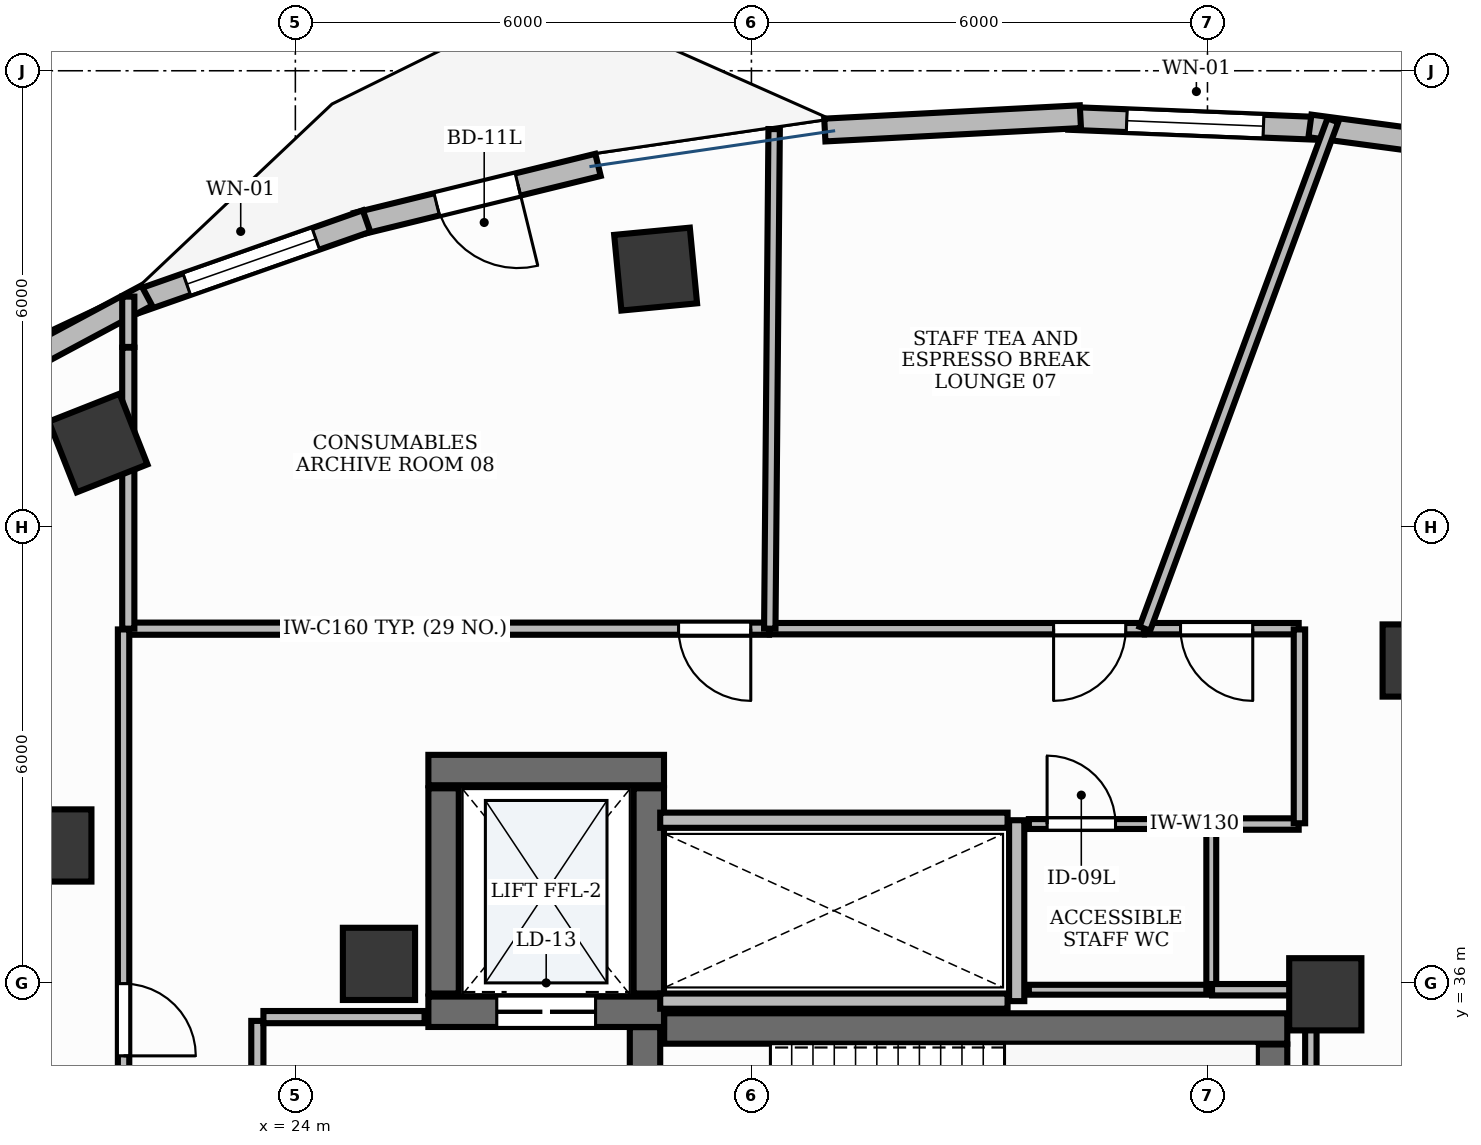
"""IFC4 building model, lengths in metres.
Left out: names, types, materials, properties, quantities, classifications, styles, units other than length and angle.
Written with IfcOpenShell. Run it as: python <this file> out.ifc"""

import sys

from ifc_helpers import new_model, si_unit, direction, frame, frame_2d, origin, origin_2d, place, context, subcontext, project, spatial, rectangle, extrude, element, fill, save


model = new_model("IFC4")
c1 = context("Model", 3, precision=1e-05, world=origin(), true_north=direction((0.0, 1.0)))
c2 = subcontext(c1, "Body", "Model", "MODEL_VIEW")
j1 = project(units=[si_unit("LENGTHUNIT", "METRE"), si_unit("PLANEANGLEUNIT", "RADIAN")], contexts=[c1])
p1 = place(None, origin())
s1 = spatial("IfcSite", under=j1, at=p1, CompositionType="ELEMENT")
p2 = place(p1, origin())
s2 = spatial("IfcBuilding", under=s1, at=p2, CompositionType="ELEMENT")
p3 = place(p2, frame((0.0, 0.0, 187.8)))
s3 = spatial("IfcBuildingStorey", under=s2, at=p3, CompositionType="ELEMENT", Elevation=187.8)
p4 = place(p3, frame((28.852, 35.4, 0.0), z_axis=(0.0, 0.0, 1.0), x_axis=(1.0, 0.0, 0.0)))
e1 = element("IfcWall", 1, at=p4, inside=s3, PredefinedType="SHEAR", context=c2, shape_type="SweptSolid", body=[
    extrude(rectangle(XDim=8.198, YDim=0.4, at=frame_2d((4.099, 0.0))), origin(), (0.0, 0.0, 1.0), 3.9),
])
p5 = place(p3, frame((36.85, 32.11, 0.0), z_axis=(0.0, 0.0, 1.0), x_axis=(0.0, 1.0, 0.0)))
e2 = element("IfcWall", 2, at=p5, inside=s3, PredefinedType="SHEAR", context=c2, shape_type="SweptSolid", body=[
    extrude(rectangle(XDim=3.08, YDim=0.4, at=frame_2d((1.54, 0.0))), origin(), (0.0, 0.0, 1.0), 3.9),
])
p6 = place(p3, frame((28.6, 32.11, 0.0), z_axis=(0.0, 0.0, 1.0), x_axis=(0.0, 1.0, 0.0)))
e3 = element("IfcWall", 3, at=p6, inside=s3, PredefinedType="SHEAR", context=c2, shape_type="SweptSolid", body=[
    extrude(rectangle(XDim=3.308, YDim=0.4, at=frame_2d((1.654, 0.0))), origin(), (0.0, 0.0, 1.0), 3.9),
])
p7 = place(p6, frame((0.2, 0.0, 0.0)))
e4 = element("IfcOpeningElement", 4, at=p7, cuts=e3, PredefinedType="OPENING", context=c2, shape_type="SweptSolid", body=[
    extrude(rectangle(XDim=1.05, YDim=2.15, at=frame_2d((0.525, 1.075))), frame((0.0, 0.215, 0.0), z_axis=(0.0, -1.0, 0.0), x_axis=(1.0, 0.0, 0.0)), (0.0, 0.0, 1.0), 0.43),
])
p8 = place(p3, frame((25.75, 38.8, 0.0), z_axis=(0.0, 0.0, 1.0), x_axis=(1.0, 0.0, 0.0)))
e5 = element("IfcWall", 5, at=p8, inside=s3, PredefinedType="SHEAR", context=c2, shape_type="SweptSolid", body=[
    extrude(rectangle(XDim=3.1, YDim=0.4, at=frame_2d((1.55, 0.0))), origin(), (0.0, 0.0, 1.0), 3.9),
])
p9 = place(p3, frame((25.75, 35.62, 0.0), z_axis=(0.0, 0.0, 1.0), x_axis=(1.0, 0.0, 0.0)))
e6 = element("IfcWall", 6, at=p9, inside=s3, PredefinedType="SHEAR", context=c2, shape_type="SweptSolid", body=[
    extrude(rectangle(XDim=3.1, YDim=0.4, at=frame_2d((1.55, 0.0))), origin(), (0.0, 0.0, 1.0), 3.9),
])
p10 = place(p9, frame((0.9, 0.0, 0.0)))
e7 = element("IfcOpeningElement", 7, at=p10, cuts=e6, PredefinedType="OPENING", context=c2, shape_type="SweptSolid", body=[
    extrude(rectangle(XDim=1.3, YDim=2.2, at=frame_2d((0.65, 1.1))), frame((0.0, 0.215, 0.0), z_axis=(0.0, -1.0, 0.0), x_axis=(1.0, 0.0, 0.0)), (0.0, 0.0, 1.0), 0.43),
])
for number, where, z_axis, x_axis in (
    (8, (25.95, 35.86, 0.0), (0.0, 0.0, 1.0), (0.0, 1.0, 0.0)),
    (9, (28.65, 35.86, 0.0), (0.0, 0.0, 1.0), (0.0, 1.0, 0.0)),
):
    element("IfcWall", number, at=place(p3, frame(where, z_axis=z_axis, x_axis=x_axis)), inside=s3, PredefinedType="SHEAR", context=c2, shape_type="SweptSolid", body=[
        extrude(rectangle(XDim=2.7, YDim=0.4, at=frame_2d((1.35, 0.0))), origin(), (0.0, 0.0, 1.0), 3.9),
    ])
for number, where, z_axis, x_axis in (
    (10, (37.55, 35.85, -0.0), (0.0, 0.0, 1.0), (1.0, 0.0, 0.0)),
    (11, (25.1, 36.25, -0.0), (0.0, 0.0, 1.0), (1.0, 0.0, 0.0)),
):
    element("IfcColumn", number, at=place(p3, frame(where, z_axis=z_axis, x_axis=x_axis)), inside=s3, PredefinedType="PILASTER", context=c2, shape_type="SweptSolid", body=[
        extrude(rectangle(XDim=0.95, YDim=0.95, at=origin_2d()), origin(), (0.0, 0.0, 1.0), 3.901),
    ])
p11 = place(p3, frame((38.779, 40.241, -0.0), z_axis=(0.0, 0.0, 1.0), x_axis=(1.0, 0.0, 0.0)))
e12 = element("IfcColumn", 12, at=p11, inside=s3, PredefinedType="COLUMN", context=c2, shape_type="SweptSolid", body=[
    extrude(rectangle(XDim=0.95, YDim=0.95, at=origin_2d()), origin(), (0.0, 0.0, 1.0), 3.901),
])
for number, where, z_axis, x_axis in (
    (13, (28.74, 45.39, -0.0), (0.0, 0.0, 1.0), (0.995, 0.095, 0.0)),
    (14, (21.406, 43.103, -0.0), (0.0, 0.0, 1.0), (0.93, 0.367, 0.0)),
):
    element("IfcColumn", number, at=place(p3, frame(where, z_axis=z_axis, x_axis=x_axis)), inside=s3, PredefinedType="COLUMN", context=c2, shape_type="SweptSolid", body=[
        extrude(rectangle(XDim=1.0, YDim=1.0, at=origin_2d()), origin(), (0.0, 0.0, 1.0), 3.901),
    ])
p12 = place(p3, frame((20.842, 37.808, -0.0), z_axis=(0.0, 0.0, 1.0), x_axis=(1.0, 0.0, 0.0)))
e15 = element("IfcColumn", 15, at=p12, inside=s3, PredefinedType="COLUMN", context=c2, shape_type="SweptSolid", body=[
    extrude(rectangle(XDim=0.95, YDim=0.95, at=origin_2d()), origin(), (0.0, 0.0, 1.0), 3.901),
])
p13 = place(p3, frame((37.5, 47.24, 0.0), z_axis=(0.0, 0.0, 1.0), x_axis=(-0.999191674443, 0.040199474165, 0.0)))
e16 = element("IfcWall", 16, at=p13, inside=s3, PredefinedType="STANDARD", context=c2, shape_type="SweptSolid", body=[
    extrude(rectangle(XDim=3.328, YDim=0.3, at=frame_2d((1.664, 0.0))), origin(), (0.0, 0.0, 1.0), 3.9),
])
p14 = place(p13, frame((0.764, 0.0, 0.9)))
e17 = element("IfcOpeningElement", 17, at=p14, cuts=e16, PredefinedType="OPENING", context=c2, shape_type="SweptSolid", body=[
    extrude(rectangle(XDim=1.8, YDim=2.1, at=frame_2d((0.9, 1.05))), frame((0.0, 0.165, 0.0), z_axis=(0.0, -1.0, 0.0), x_axis=(1.0, 0.0, 0.0)), (0.0, 0.0, 1.0), 0.33),
])
p15 = place(p3, frame((27.982, 46.762, 0.0), z_axis=(0.0, 0.0, 1.0), x_axis=(-0.971312804689, -0.237805457142, 0.0)))
e18 = element("IfcWall", 18, at=p15, inside=s3, PredefinedType="STANDARD", context=c2, shape_type="SweptSolid", body=[
    extrude(rectangle(XDim=3.269, YDim=0.3, at=frame_2d((1.634, 0.0))), origin(), (0.0, 0.0, 1.0), 3.9),
])
p16 = place(p15, frame((1.084, 0.0, 0.0)))
e19 = element("IfcOpeningElement", 19, at=p16, cuts=e18, PredefinedType="OPENING", context=c2, shape_type="SweptSolid", body=[
    extrude(rectangle(XDim=1.1, YDim=2.15, at=frame_2d((0.55, 1.075))), frame((0.0, 0.165, 0.0), z_axis=(0.0, -1.0, 0.0), x_axis=(1.0, 0.0, 0.0)), (0.0, 0.0, 1.0), 0.33),
])
p17 = place(p3, frame((24.937, 46.023, 0.0), z_axis=(0.0, 0.0, 1.0), x_axis=(-0.943495444321, -0.331385495377, 0.0)))
e20 = element("IfcWall", 20, at=p17, inside=s3, PredefinedType="STANDARD", context=c2, shape_type="SweptSolid", body=[
    extrude(rectangle(XDim=3.214, YDim=0.3, at=frame_2d((1.607, 0.0))), origin(), (0.0, 0.0, 1.0), 3.9),
])
p18 = place(p17, frame((0.707, 0.0, 0.9)))
e21 = element("IfcOpeningElement", 21, at=p18, cuts=e20, PredefinedType="OPENING", context=c2, shape_type="SweptSolid", body=[
    extrude(rectangle(XDim=1.8, YDim=2.1, at=frame_2d((0.9, 1.05))), frame((0.0, 0.165, 0.0), z_axis=(0.0, -1.0, 0.0), x_axis=(1.0, 0.0, 0.0)), (0.0, 0.0, 1.0), 0.33),
])
p19 = place(p3, frame((40.669, 46.829, 0.0), z_axis=(0.0, 0.0, 1.0), x_axis=(-0.991137940717, 0.132836675925, 0.0)))
e22 = element("IfcWall", 22, at=p19, inside=s3, PredefinedType="STANDARD", context=c2, shape_type="SweptSolid", body=[
    extrude(rectangle(XDim=3.351, YDim=0.3, at=frame_2d((1.675, 0.0))), origin(), (0.0, 0.0, 1.0), 3.9),
])
p20 = place(p3, frame((34.328, 47.396, 0.0), z_axis=(0.0, 0.0, 1.0), x_axis=(-0.998639777298, -0.052140149581, 0.0)))
e23 = element("IfcWall", 23, at=p20, inside=s3, PredefinedType="STANDARD", context=c2, shape_type="SweptSolid", body=[
    extrude(rectangle(XDim=3.367, YDim=0.3, at=frame_2d((1.683, 0.0))), origin(), (0.0, 0.0, 1.0), 3.9),
])
p21 = place(p3, frame((22.044, 45.043, 0.0), z_axis=(0.0, 0.0, 1.0), x_axis=(-0.881364369565, -0.472437136624, 0.0)))
e24 = element("IfcWall", 24, at=p21, inside=s3, PredefinedType="STANDARD", context=c2, shape_type="SweptSolid", body=[
    extrude(rectangle(XDim=6.124, YDim=0.3, at=frame_2d((3.062, 0.0))), origin(), (0.0, 0.0, 1.0), 3.47),
])
p22 = place(p3, frame((33.49, 35.76, 0.0), z_axis=(0.0, 0.0, 1.0), x_axis=(0.0, 1.0, 0.0)))
e25 = element("IfcWall", 25, at=p22, inside=s3, PredefinedType="PARTITIONING", context=c2, shape_type="SweptSolid", body=[
    extrude(rectangle(XDim=2.38, YDim=0.2, at=frame_2d((1.19, 0.0))), origin(), (0.0, 0.0, 1.0), 2.91),
])
for number, where, z_axis, x_axis in (
    (26, (28.8, 35.76, 0.0), (0.0, 0.0, 1.0), (1.0, 0.0, 0.0)),
    (27, (28.8, 38.14, 0.0), (0.0, 0.0, 1.0), (1.0, 0.0, 0.0)),
):
    element("IfcWall", number, at=place(p3, frame(where, z_axis=z_axis, x_axis=x_axis)), inside=s3, PredefinedType="PARTITIONING", context=c2, shape_type="SweptSolid", body=[
        extrude(rectangle(XDim=4.57, YDim=0.2, at=frame_2d((2.285, 0.0))), origin(), (0.0, 0.0, 1.0), 2.91),
    ])
p23 = place(p3, frame((23.5, 32.1, 0.0), z_axis=(0.0, 0.0, 1.0), x_axis=(0.0, 1.0, 0.0)))
e28 = element("IfcWall", 28, at=p23, inside=s3, PredefinedType="PARTITIONING", context=c2, shape_type="SweptSolid", body=[
    extrude(rectangle(XDim=3.4, YDim=0.16, at=frame_2d((1.7, 0.0))), origin(), (0.0, 0.0, 1.0), 2.91),
])
p24 = place(p23, frame((1.175, 0.0, 0.0)))
e29 = element("IfcOpeningElement", 29, at=p24, cuts=e28, PredefinedType="OPENING", context=c2, shape_type="SweptSolid", body=[
    extrude(rectangle(XDim=1.05, YDim=2.15, at=frame_2d((0.525, 1.075))), frame((0.0, 0.095, 0.0), z_axis=(0.0, -1.0, 0.0), x_axis=(1.0, 0.0, 0.0)), (0.0, 0.0, 1.0), 0.19),
])
p25 = place(p3, frame((23.58, 35.55, 0.0), z_axis=(0.0, 0.0, 1.0), x_axis=(1.0, 0.0, 0.0)))
e30 = element("IfcWall", 30, at=p25, inside=s3, PredefinedType="PARTITIONING", context=c2, shape_type="SweptSolid", body=[
    extrude(rectangle(XDim=2.12, YDim=0.16, at=frame_2d((1.06, 0.0))), origin(), (0.0, 0.0, 1.0), 2.91),
])
p26 = place(p3, frame((33.65, 38.09, 0.0), z_axis=(0.0, 0.0, 1.0), x_axis=(1.0, 0.0, 0.0)))
e31 = element("IfcWall", 31, at=p26, inside=s3, PredefinedType="PARTITIONING", context=c2, shape_type="SweptSolid", body=[
    extrude(rectangle(XDim=2.4, YDim=0.13, at=frame_2d((1.2, 0.0))), origin(), (0.0, 0.0, 1.0), 2.91),
])
p27 = place(p26, frame((0.24, 0.0, 0.0)))
e32 = element("IfcOpeningElement", 32, at=p27, cuts=e31, PredefinedType="OPENING", context=c2, shape_type="SweptSolid", body=[
    extrude(rectangle(XDim=0.9, YDim=2.15, at=frame_2d((0.45, 1.075))), frame((0.0, 0.08, 0.0), z_axis=(0.0, -1.0, 0.0), x_axis=(1.0, 0.0, 0.0)), (0.0, 0.0, 1.0), 0.16),
])
p28 = place(p3, frame((37.2, 40.66, 0.0), z_axis=(0.0, 0.0, 1.0), x_axis=(-1.0, 0.0, 0.0)))
e33 = element("IfcWall", 33, at=p28, inside=s3, PredefinedType="PARTITIONING", context=c2, shape_type="SweptSolid", body=[
    extrude(rectangle(XDim=2.024, YDim=0.15, at=frame_2d((1.012, 0.0))), origin(), (0.0, 0.0, 1.0), 2.91),
])
p29 = place(p28, frame((0.604, 0.0, 0.0)))
e34 = element("IfcOpeningElement", 34, at=p29, cuts=e33, PredefinedType="OPENING", context=c2, shape_type="SweptSolid", body=[
    extrude(rectangle(XDim=0.95, YDim=2.15, at=frame_2d((0.475, 1.075))), frame((0.0, 0.09, 0.0), z_axis=(0.0, -1.0, 0.0), x_axis=(1.0, 0.0, 0.0)), (0.0, 0.0, 1.0), 0.18),
])
p30 = place(p3, frame((35.166, 40.66, 0.0), z_axis=(0.0, 0.0, 1.0), x_axis=(-1.0, 0.0, 0.0)))
e35 = element("IfcWall", 35, at=p30, inside=s3, PredefinedType="PARTITIONING", context=c2, shape_type="SweptSolid", body=[
    extrude(rectangle(XDim=4.924, YDim=0.15, at=frame_2d((2.462, 0.0))), origin(), (0.0, 0.0, 1.0), 2.91),
])
p31 = place(p30, frame((0.24, 0.0, 0.0)))
e36 = element("IfcOpeningElement", 36, at=p31, cuts=e35, PredefinedType="OPENING", context=c2, shape_type="SweptSolid", body=[
    extrude(rectangle(XDim=0.95, YDim=2.15, at=frame_2d((0.475, 1.075))), frame((0.0, 0.09, 0.0), z_axis=(0.0, -1.0, 0.0), x_axis=(1.0, 0.0, 0.0)), (0.0, 0.0, 1.0), 0.18),
])
p32 = place(p3, frame((30.232, 40.66, 0.0), z_axis=(0.0, 0.0, 1.0), x_axis=(-1.0, 0.0, 0.0)))
e37 = element("IfcWall", 37, at=p32, inside=s3, PredefinedType="PARTITIONING", context=c2, shape_type="SweptSolid", body=[
    extrude(rectangle(XDim=8.43, YDim=0.16, at=frame_2d((4.215, 0.0))), origin(), (0.0, 0.0, 1.0), 2.91),
])
p33 = place(p32, frame((0.24, 0.0, 0.0)))
e38 = element("IfcOpeningElement", 38, at=p33, cuts=e37, PredefinedType="OPENING", context=c2, shape_type="SweptSolid", body=[
    extrude(rectangle(XDim=0.95, YDim=2.15, at=frame_2d((0.475, 1.075))), frame((0.0, 0.095, 0.0), z_axis=(0.0, -1.0, 0.0), x_axis=(1.0, 0.0, 0.0)), (0.0, 0.0, 1.0), 0.19),
])
p34 = place(p3, frame((21.74, 40.65, 0.0), z_axis=(0.0, 0.0, 1.0), x_axis=(0.0, -1.0, 0.0)))
e39 = element("IfcWall", 39, at=p34, inside=s3, PredefinedType="PARTITIONING", context=c2, shape_type="SweptSolid", body=[
    extrude(rectangle(XDim=5.85, YDim=0.15, at=frame_2d((2.925, 0.0))), origin(), (0.0, 0.0, 1.0), 2.91),
])
p35 = place(p34, frame((4.66, 0.0, 0.0)))
e40 = element("IfcOpeningElement", 40, at=p35, cuts=e39, PredefinedType="OPENING", context=c2, shape_type="SweptSolid", body=[
    extrude(rectangle(XDim=0.95, YDim=2.15, at=frame_2d((0.475, 1.075))), frame((0.0, 0.09, 0.0), z_axis=(0.0, -1.0, 0.0), x_axis=(1.0, 0.0, 0.0)), (0.0, 0.0, 1.0), 0.18),
])
p36 = place(p3, frame((36.05, 35.91, 0.0), z_axis=(0.0, 0.0, 1.0), x_axis=(-1.0, 0.0, 0.0)))
e41 = element("IfcWall", 41, at=p36, inside=s3, PredefinedType="PARTITIONING", context=c2, shape_type="SweptSolid", body=[
    extrude(rectangle(XDim=2.4, YDim=0.13, at=frame_2d((1.2, 0.0))), origin(), (0.0, 0.0, 1.0), 2.91),
])
p37 = place(p3, frame((36.05, 38.09, 0.0), z_axis=(0.0, 0.0, 1.0), x_axis=(0.0, -1.0, 0.0)))
e42 = element("IfcWall", 42, at=p37, inside=s3, PredefinedType="PARTITIONING", context=c2, shape_type="SweptSolid", body=[
    extrude(rectangle(XDim=2.18, YDim=0.13, at=frame_2d((1.09, 0.0))), origin(), (0.0, 0.0, 1.0), 2.91),
])
p38 = place(p3, frame((37.36, 31.702, 0.0), z_axis=(0.0, 0.0, 1.0), x_axis=(0.0, 1.0, 0.0)))
e43 = element("IfcWall", 43, at=p38, inside=s3, PredefinedType="PARTITIONING", context=c2, shape_type="SweptSolid", body=[
    extrude(rectangle(XDim=4.198, YDim=0.15, at=frame_2d((2.099, 0.0))), origin(), (0.0, 0.0, 1.0), 2.91),
])
p39 = place(p3, frame((37.35, 35.91, 0.0), z_axis=(0.0, 0.0, 1.0), x_axis=(-1.0, 0.0, 0.0)))
e44 = element("IfcWall", 44, at=p39, inside=s3, PredefinedType="PARTITIONING", context=c2, shape_type="SweptSolid", body=[
    extrude(rectangle(XDim=1.29, YDim=0.15, at=frame_2d((0.645, 0.0))), origin(), (0.0, 0.0, 1.0), 2.91),
])
p40 = place(p3, frame((36.06, 38.09, 0.0), z_axis=(0.0, 0.0, 1.0), x_axis=(1.0, 0.0, 0.0)))
e45 = element("IfcWall", 45, at=p40, inside=s3, PredefinedType="PARTITIONING", context=c2, shape_type="SweptSolid", body=[
    extrude(rectangle(XDim=1.14, YDim=0.15, at=frame_2d((0.57, 0.0))), origin(), (0.0, 0.0, 1.0), 2.91),
])
p41 = place(p3, frame((37.21, 38.1, 0.0), z_axis=(0.0, 0.0, 1.0), x_axis=(0.0, 1.0, 0.0)))
e46 = element("IfcWall", 46, at=p41, inside=s3, PredefinedType="PARTITIONING", context=c2, shape_type="SweptSolid", body=[
    extrude(rectangle(XDim=2.55, YDim=0.15, at=frame_2d((1.275, 0.0))), origin(), (0.0, 0.0, 1.0), 2.91),
])
p42 = place(p3, frame((35.176, 40.66, 0.0), z_axis=(0.0, 0.0, 1.0), x_axis=(0.346944137663, 0.937885795468, 0.0)))
e47 = element("IfcWall", 47, at=p42, inside=s3, PredefinedType="PARTITIONING", context=c2, shape_type="SweptSolid", body=[
    extrude(rectangle(XDim=7.131, YDim=0.15, at=frame_2d((3.565, 0.0))), origin(), (0.0, 0.0, 1.0), 2.91),
])
p43 = place(p3, frame((30.242, 40.66, 0.0), z_axis=(0.0, 0.0, 1.0), x_axis=(0.008728912263, 0.99996190232, 0.0)))
e48 = element("IfcWall", 48, at=p43, inside=s3, PredefinedType="PARTITIONING", context=c2, shape_type="SweptSolid", body=[
    extrude(rectangle(XDim=6.573, YDim=0.15, at=frame_2d((3.286, 0.0))), origin(), (0.0, 0.0, 1.0), 2.91),
])
p44 = place(p3, frame((21.802, 44.367, 0.0), z_axis=(0.0, 0.0, 1.0), x_axis=(0.0, 1.0, 0.0)))
e49 = element("IfcWall", 49, at=p44, inside=s3, PredefinedType="PARTITIONING", context=c2, shape_type="SweptSolid", body=[
    extrude(rectangle(XDim=0.662, YDim=0.16, at=frame_2d((0.331, 0.0))), origin(), (0.0, 0.0, 1.0), 2.91),
])
p45 = place(p3, frame((21.802, 40.66, 0.0), z_axis=(0.0, 0.0, 1.0), x_axis=(0.0, 1.0, 0.0)))
e50 = element("IfcWall", 50, at=p45, inside=s3, PredefinedType="PARTITIONING", context=c2, shape_type="SweptSolid", body=[
    extrude(rectangle(XDim=3.697, YDim=0.16, at=frame_2d((1.849, 0.0))), origin(), (0.0, 0.0, 1.0), 2.91),
])
p46 = place(p14, origin())
e51 = element("IfcWindow", 51, at=p46, inside=s3, PartitioningType="SINGLE_PANEL", PredefinedType="WINDOW", context=c2, shape_type="SweptSolid", body=[
    extrude(rectangle(XDim=1.8, YDim=2.1, at=frame_2d((0.9, 1.05))), frame((0.0, 0.03, 0.0), z_axis=(0.0, -1.0, 0.0), x_axis=(1.0, 0.0, 0.0)), (0.0, 0.0, 1.0), 0.06),
])
fill(e17, e51)
p47 = place(p16, origin())
e52 = element("IfcDoor", 52, at=p47, inside=s3, OperationType="SINGLE_SWING_LEFT", PredefinedType="DOOR", context=c2, shape_type="SweptSolid", body=[
    extrude(rectangle(XDim=1.1, YDim=2.15, at=frame_2d((0.55, 1.075))), frame((0.0, 0.025, 0.0), z_axis=(0.0, -1.0, 0.0), x_axis=(1.0, 0.0, 0.0)), (0.0, 0.0, 1.0), 0.05),
])
fill(e19, e52)
p48 = place(p18, origin())
e53 = element("IfcWindow", 53, at=p48, inside=s3, PartitioningType="SINGLE_PANEL", PredefinedType="WINDOW", context=c2, shape_type="SweptSolid", body=[
    extrude(rectangle(XDim=1.8, YDim=2.1, at=frame_2d((0.9, 1.05))), frame((0.0, 0.03, 0.0), z_axis=(0.0, -1.0, 0.0), x_axis=(1.0, 0.0, 0.0)), (0.0, 0.0, 1.0), 0.06),
])
fill(e21, e53)
p49 = place(p10, origin())
e54 = element("IfcDoor", 54, at=p49, inside=s3, OperationType="DOUBLE_DOOR_SLIDING", PredefinedType="DOOR", context=c2, shape_type="SweptSolid", body=[
    extrude(rectangle(XDim=1.3, YDim=2.2, at=frame_2d((0.65, 1.1))), frame((0.0, 0.025, 0.0), z_axis=(0.0, -1.0, 0.0), x_axis=(1.0, 0.0, 0.0)), (0.0, 0.0, 1.0), 0.05),
])
fill(e7, e54)
p50 = place(p27, origin())
e55 = element("IfcDoor", 55, at=p50, inside=s3, OperationType="SINGLE_SWING_LEFT", PredefinedType="DOOR", context=c2, shape_type="SweptSolid", body=[
    extrude(rectangle(XDim=0.9, YDim=2.15, at=frame_2d((0.45, 1.075))), frame((0.0, 0.025, 0.0), z_axis=(0.0, -1.0, 0.0), x_axis=(1.0, 0.0, 0.0)), (0.0, 0.0, 1.0), 0.05),
])
fill(e32, e55)
p51 = place(p29, origin())
e56 = element("IfcDoor", 56, at=p51, inside=s3, OperationType="SINGLE_SWING_LEFT", PredefinedType="DOOR", context=c2, shape_type="SweptSolid", body=[
    extrude(rectangle(XDim=0.95, YDim=2.15, at=frame_2d((0.475, 1.075))), frame((0.0, 0.025, 0.0), z_axis=(0.0, -1.0, 0.0), x_axis=(1.0, 0.0, 0.0)), (0.0, 0.0, 1.0), 0.05),
])
fill(e34, e56)
p52 = place(p31, origin())
e57 = element("IfcDoor", 57, at=p52, inside=s3, OperationType="SINGLE_SWING_RIGHT", PredefinedType="DOOR", context=c2, shape_type="SweptSolid", body=[
    extrude(rectangle(XDim=0.95, YDim=2.15, at=frame_2d((0.475, 1.075))), frame((0.0, 0.025, 0.0), z_axis=(0.0, -1.0, 0.0), x_axis=(1.0, 0.0, 0.0)), (0.0, 0.0, 1.0), 0.05),
])
fill(e36, e57)
p53 = place(p33, origin())
e58 = element("IfcDoor", 58, at=p53, inside=s3, OperationType="SINGLE_SWING_LEFT", PredefinedType="DOOR", context=c2, shape_type="SweptSolid", body=[
    extrude(rectangle(XDim=0.95, YDim=2.15, at=frame_2d((0.475, 1.075))), frame((0.0, 0.025, 0.0), z_axis=(0.0, -1.0, 0.0), x_axis=(1.0, 0.0, 0.0)), (0.0, 0.0, 1.0), 0.05),
])
fill(e38, e58)
p54 = place(p35, origin())
e59 = element("IfcDoor", 59, at=p54, inside=s3, OperationType="SINGLE_SWING_RIGHT", PredefinedType="DOOR", context=c2, shape_type="SweptSolid", body=[
    extrude(rectangle(XDim=0.95, YDim=2.15, at=frame_2d((0.475, 1.075))), frame((0.0, 0.025, 0.0), z_axis=(0.0, -1.0, 0.0), x_axis=(1.0, 0.0, 0.0)), (0.0, 0.0, 1.0), 0.05),
])
fill(e40, e59)
save(model, sys.argv[1])
